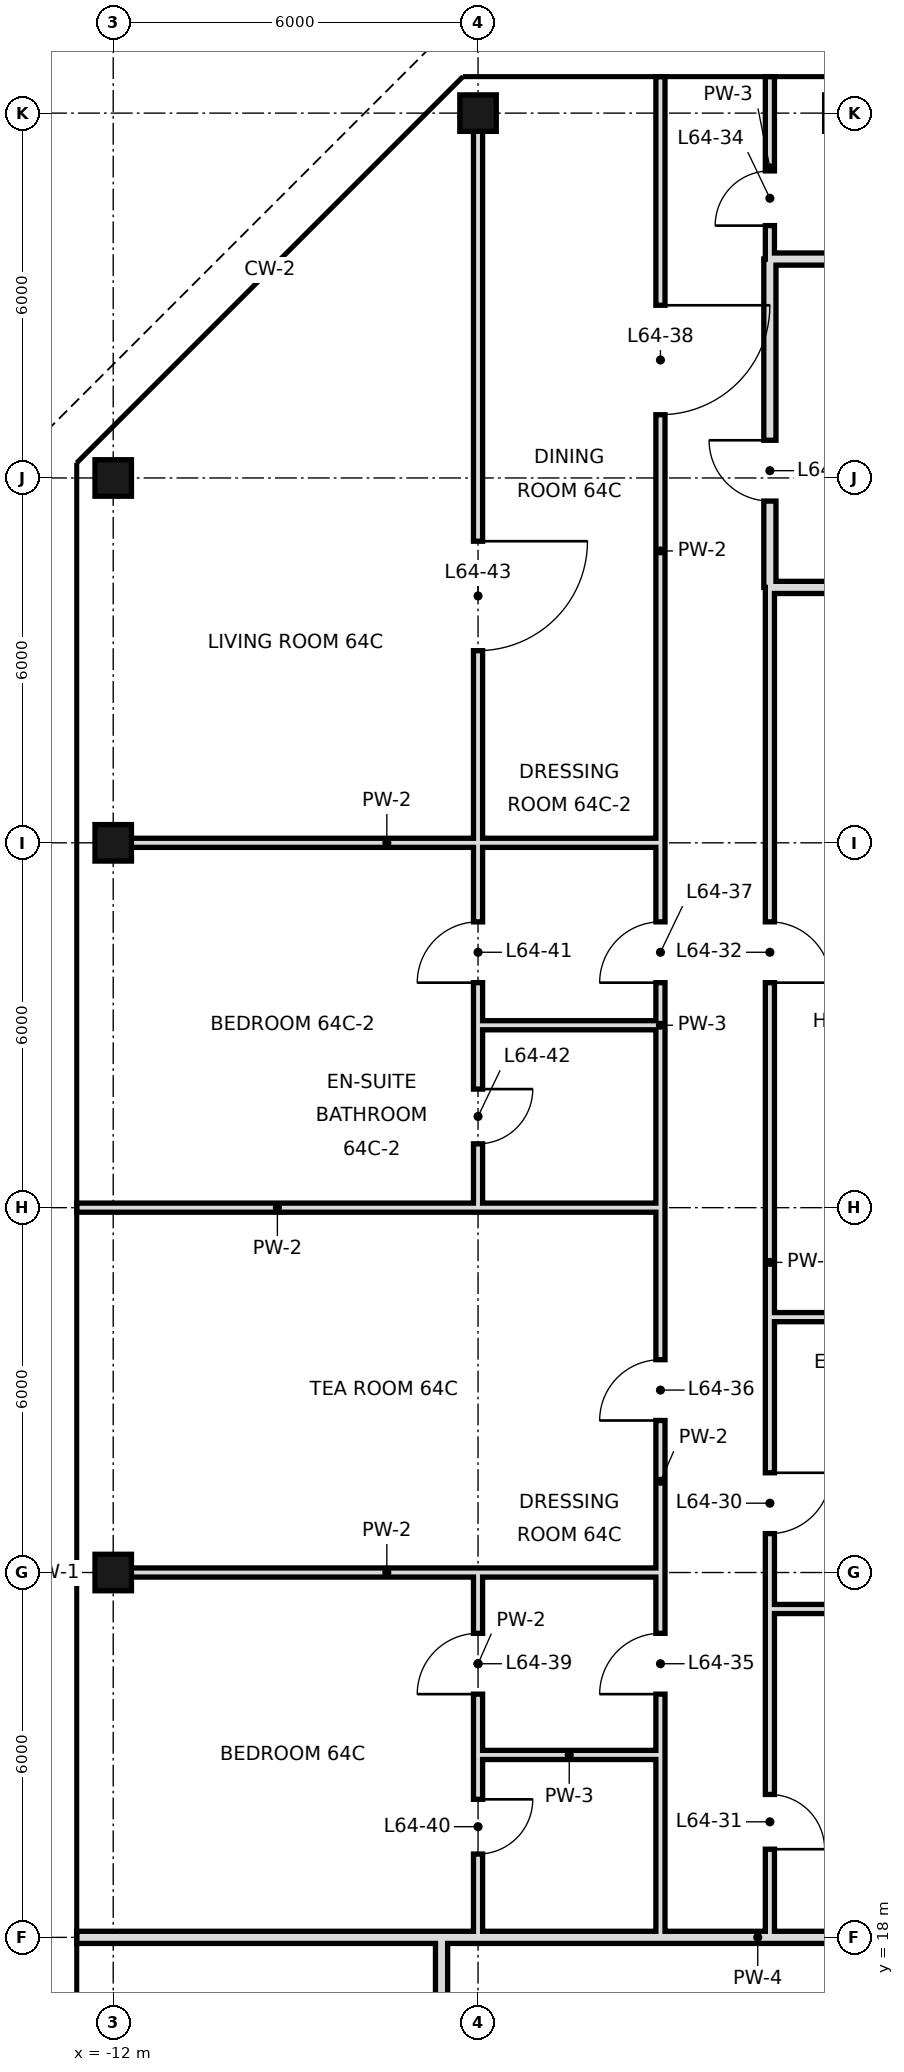
"""IFC4 building model, lengths in metres.
Left out: names, types, materials, properties, quantities, classifications, styles, units other than length and angle.
Written with IfcOpenShell. Run it as: python <this file> out.ifc"""

import sys

from ifc_helpers import new_model, si_unit, direction, frame, frame_2d, origin, origin_2d, place, context, subcontext, project, spatial, rectangle, hollow_rectangle, extrude, element, fill, save


model = new_model("IFC4")
c1 = context("Model", 3, precision=1e-05, world=origin(), true_north=direction((0.0, 1.0)))
c2 = subcontext(c1, "Body", "Model", "MODEL_VIEW")
j1 = project(units=[si_unit("LENGTHUNIT", "METRE"), si_unit("PLANEANGLEUNIT", "RADIAN")], contexts=[c1])
p1 = place(None, origin())
s1 = spatial("IfcSite", under=j1, at=p1, CompositionType="ELEMENT")
p2 = place(p1, origin())
s2 = spatial("IfcBuilding", under=s1, at=p2, CompositionType="ELEMENT")
p3 = place(p2, frame((0.0, 0.0, 270.2)))
s3 = spatial("IfcBuildingStorey", under=s2, at=p3, CompositionType="ELEMENT", Elevation=270.2)
for number, where, z_axis, x_axis in (
    (1, (-12.0, 24.0, 0.0), (0.0, 0.0, 1.0), (1.0, 0.0, 0.0)),
    (2, (-12.0, 36.0, 0.0), (0.0, 0.0, 1.0), (1.0, 0.0, 0.0)),
    (3, (-12.0, 42.0, 0.0), (0.0, 0.0, 1.0), (1.0, 0.0, 0.0)),
    (4, (-6.0, 48.0, 0.0), (0.0, 0.0, 1.0), (1.0, 0.0, 0.0)),
):
    element("IfcColumn", number, at=place(p3, frame(where, z_axis=z_axis, x_axis=x_axis)), inside=s3, PredefinedType="COLUMN", context=c2, shape_type="SweptSolid", body=[
        extrude(hollow_rectangle(XDim=0.6, YDim=0.6, WallThickness=0.028, at=origin_2d()), origin(), (0.0, 0.0, 1.0), 3.6),
    ])
p4 = place(p3, frame((-1.2, 40.2, 0.0), z_axis=(0.0, 0.0, 1.0), x_axis=(0.0, 1.0, 0.0)))
e5 = element("IfcWall", 5, at=p4, inside=s3, PredefinedType="SOLIDWALL", context=c2, shape_type="SweptSolid", body=[
    extrude(rectangle(XDim=5.4, YDim=0.2, at=frame_2d((2.7, 0.0))), origin(), (0.0, 0.0, 1.0), 2.72),
])
p5 = place(p4, frame((1.42, 0.0, 0.0)))
e6 = element("IfcOpeningElement", 6, at=p5, cuts=e5, PredefinedType="OPENING", context=c2, shape_type="SweptSolid", body=[
    extrude(rectangle(XDim=1.0, YDim=2.4, at=frame_2d((0.5, 1.2))), frame((0.0, 0.11, 0.0), z_axis=(0.0, -1.0, 0.0), x_axis=(1.0, 0.0, 0.0)), (0.0, 0.0, 1.0), 0.22),
])
p6 = place(p3, frame((-1.2, 18.0, 0.0), z_axis=(0.0, 0.0, 1.0), x_axis=(0.0, 1.0, 0.0)))
e7 = element("IfcWall", 7, at=p6, inside=s3, PredefinedType="PARTITIONING", context=c2, shape_type="SweptSolid", body=[
    extrude(rectangle(XDim=22.2, YDim=0.15, at=frame_2d((11.1, 0.0))), origin(), (0.0, 0.0, 1.0), 3.42),
])
p7 = place(p6, frame((6.64, 0.0, 0.0)))
e8 = element("IfcOpeningElement", 8, at=p7, cuts=e7, PredefinedType="OPENING", context=c2, shape_type="SweptSolid", body=[
    extrude(rectangle(XDim=1.0, YDim=2.4, at=frame_2d((0.5, 1.2))), frame((0.0, 0.085, 0.0), z_axis=(0.0, -1.0, 0.0), x_axis=(1.0, 0.0, 0.0)), (0.0, 0.0, 1.0), 0.17),
])
p8 = place(p6, frame((1.45, 0.0, 0.0)))
e9 = element("IfcOpeningElement", 9, at=p8, cuts=e7, PredefinedType="OPENING", context=c2, shape_type="SweptSolid", body=[
    extrude(rectangle(XDim=0.9, YDim=2.1, at=frame_2d((0.45, 1.05))), frame((0.0, 0.085, 0.0), z_axis=(0.0, -1.0, 0.0), x_axis=(1.0, 0.0, 0.0)), (0.0, 0.0, 1.0), 0.17),
])
p9 = place(p6, frame((15.7, 0.0, 0.0)))
e10 = element("IfcOpeningElement", 10, at=p9, cuts=e7, PredefinedType="OPENING", context=c2, shape_type="SweptSolid", body=[
    extrude(rectangle(XDim=1.0, YDim=2.4, at=frame_2d((0.5, 1.2))), frame((0.0, 0.085, 0.0), z_axis=(0.0, -1.0, 0.0), x_axis=(1.0, 0.0, 0.0)), (0.0, 0.0, 1.0), 0.17),
])
p10 = place(p3, frame((-1.2, 45.6, 0.0), z_axis=(0.0, 0.0, 1.0), x_axis=(0.0, 1.0, 0.0)))
e11 = element("IfcWall", 11, at=p10, inside=s3, PredefinedType="PARTITIONING", context=c2, shape_type="SweptSolid", body=[
    extrude(rectangle(XDim=3.0, YDim=0.15, at=frame_2d((1.5, 0.0))), origin(), (0.0, 0.0, 1.0), 3.42),
])
p11 = place(p10, frame((0.55, 0.0, 0.0)))
e12 = element("IfcOpeningElement", 12, at=p11, cuts=e11, PredefinedType="OPENING", context=c2, shape_type="SweptSolid", body=[
    extrude(rectangle(XDim=0.9, YDim=2.4, at=frame_2d((0.45, 1.2))), frame((0.0, 0.085, 0.0), z_axis=(0.0, -1.0, 0.0), x_axis=(1.0, 0.0, 0.0)), (0.0, 0.0, 1.0), 0.17),
])
p12 = place(p3, frame((-3.0, 21.0, 0.0), z_axis=(0.0, 0.0, 1.0), x_axis=(0.0, 1.0, 0.0)))
e13 = element("IfcWall", 13, at=p12, inside=s3, PredefinedType="PARTITIONING", context=c2, shape_type="SweptSolid", body=[
    extrude(rectangle(XDim=9.0, YDim=0.15, at=frame_2d((4.5, 0.0))), origin(), (0.0, 0.0, 1.0), 3.42),
])
p13 = place(p12, frame((1.0, 0.0, 0.0)))
e14 = element("IfcOpeningElement", 14, at=p13, cuts=e13, PredefinedType="OPENING", context=c2, shape_type="SweptSolid", body=[
    extrude(rectangle(XDim=1.0, YDim=2.4, at=frame_2d((0.5, 1.2))), frame((0.0, 0.085, 0.0), z_axis=(0.0, -1.0, 0.0), x_axis=(1.0, 0.0, 0.0)), (0.0, 0.0, 1.0), 0.17),
])
p14 = place(p12, frame((5.5, 0.0, 0.0)))
e15 = element("IfcOpeningElement", 15, at=p14, cuts=e13, PredefinedType="OPENING", context=c2, shape_type="SweptSolid", body=[
    extrude(rectangle(XDim=1.0, YDim=2.4, at=frame_2d((0.5, 1.2))), frame((0.0, 0.085, 0.0), z_axis=(0.0, -1.0, 0.0), x_axis=(1.0, 0.0, 0.0)), (0.0, 0.0, 1.0), 0.17),
])
p15 = place(p3, frame((-3.0, 33.0, 0.0), z_axis=(0.0, 0.0, 1.0), x_axis=(0.0, 1.0, 0.0)))
e16 = element("IfcWall", 16, at=p15, inside=s3, PredefinedType="PARTITIONING", context=c2, shape_type="SweptSolid", body=[
    extrude(rectangle(XDim=15.6, YDim=0.15, at=frame_2d((7.8, 0.0))), origin(), (0.0, 0.0, 1.0), 3.42),
])
p16 = place(p15, frame((0.7, 0.0, 0.0)))
e17 = element("IfcOpeningElement", 17, at=p16, cuts=e16, PredefinedType="OPENING", context=c2, shape_type="SweptSolid", body=[
    extrude(rectangle(XDim=1.0, YDim=2.4, at=frame_2d((0.5, 1.2))), frame((0.0, 0.085, 0.0), z_axis=(0.0, -1.0, 0.0), x_axis=(1.0, 0.0, 0.0)), (0.0, 0.0, 1.0), 0.17),
])
p17 = place(p15, frame((10.04, 0.0, 0.0)))
e18 = element("IfcOpeningElement", 18, at=p17, cuts=e16, PredefinedType="OPENING", context=c2, shape_type="SweptSolid", body=[
    extrude(rectangle(XDim=1.8, YDim=2.4, at=frame_2d((0.9, 1.2))), frame((0.0, 0.085, 0.0), z_axis=(0.0, -1.0, 0.0), x_axis=(1.0, 0.0, 0.0)), (0.0, 0.0, 1.0), 0.17),
])
for number, where, z_axis, x_axis in (
    (19, (-3.0, 18.0, 0.0), (0.0, 0.0, 1.0), (0.0, 1.0, 0.0)),
    (20, (-3.0, 30.0, 0.0), (0.0, 0.0, 1.0), (0.0, 1.0, 0.0)),
):
    element("IfcWall", number, at=place(p3, frame(where, z_axis=z_axis, x_axis=x_axis)), inside=s3, PredefinedType="PARTITIONING", context=c2, shape_type="SweptSolid", body=[
        extrude(rectangle(XDim=3.0, YDim=0.15, at=frame_2d((1.5, 0.0))), origin(), (0.0, 0.0, 1.0), 3.42),
    ])
p18 = place(p3, frame((-6.0, 21.0, 0.0), z_axis=(0.0, 0.0, 1.0), x_axis=(0.0, 1.0, 0.0)))
e21 = element("IfcWall", 21, at=p18, inside=s3, PredefinedType="PARTITIONING", context=c2, shape_type="SweptSolid", body=[
    extrude(rectangle(XDim=3.0, YDim=0.15, at=frame_2d((1.5, 0.0))), origin(), (0.0, 0.0, 1.0), 3.42),
])
p19 = place(p18, frame((1.0, 0.0, 0.0)))
e22 = element("IfcOpeningElement", 22, at=p19, cuts=e21, PredefinedType="OPENING", context=c2, shape_type="SweptSolid", body=[
    extrude(rectangle(XDim=1.0, YDim=2.4, at=frame_2d((0.5, 1.2))), frame((0.0, 0.085, 0.0), z_axis=(0.0, -1.0, 0.0), x_axis=(1.0, 0.0, 0.0)), (0.0, 0.0, 1.0), 0.17),
])
p20 = place(p3, frame((-6.0, 33.0, 0.0), z_axis=(0.0, 0.0, 1.0), x_axis=(0.0, 1.0, 0.0)))
e23 = element("IfcWall", 23, at=p20, inside=s3, PredefinedType="PARTITIONING", context=c2, shape_type="SweptSolid", body=[
    extrude(rectangle(XDim=15.0, YDim=0.15, at=frame_2d((7.5, 0.0))), origin(), (0.0, 0.0, 1.0), 3.42),
])
p21 = place(p20, frame((0.7, 0.0, 0.0)))
e24 = element("IfcOpeningElement", 24, at=p21, cuts=e23, PredefinedType="OPENING", context=c2, shape_type="SweptSolid", body=[
    extrude(rectangle(XDim=1.0, YDim=2.4, at=frame_2d((0.5, 1.2))), frame((0.0, 0.085, 0.0), z_axis=(0.0, -1.0, 0.0), x_axis=(1.0, 0.0, 0.0)), (0.0, 0.0, 1.0), 0.17),
])
p22 = place(p20, frame((6.16, 0.0, 0.0)))
e25 = element("IfcOpeningElement", 25, at=p22, cuts=e23, PredefinedType="OPENING", context=c2, shape_type="SweptSolid", body=[
    extrude(rectangle(XDim=1.8, YDim=2.4, at=frame_2d((0.9, 1.2))), frame((0.0, 0.085, 0.0), z_axis=(0.0, -1.0, 0.0), x_axis=(1.0, 0.0, 0.0)), (0.0, 0.0, 1.0), 0.17),
])
p23 = place(p3, frame((-6.0, 18.0, 0.0), z_axis=(0.0, 0.0, 1.0), x_axis=(0.0, 1.0, 0.0)))
e26 = element("IfcWall", 26, at=p23, inside=s3, PredefinedType="PARTITIONING", context=c2, shape_type="SweptSolid", body=[
    extrude(rectangle(XDim=3.0, YDim=0.15, at=frame_2d((1.5, 0.0))), origin(), (0.0, 0.0, 1.0), 3.42),
])
p24 = place(p23, frame((1.37, 0.0, 0.0)))
e27 = element("IfcOpeningElement", 27, at=p24, cuts=e26, PredefinedType="OPENING", context=c2, shape_type="SweptSolid", body=[
    extrude(rectangle(XDim=0.9, YDim=2.4, at=frame_2d((0.45, 1.2))), frame((0.0, 0.085, 0.0), z_axis=(0.0, -1.0, 0.0), x_axis=(1.0, 0.0, 0.0)), (0.0, 0.0, 1.0), 0.17),
])
p25 = place(p3, frame((-6.0, 30.0, 0.0), z_axis=(0.0, 0.0, 1.0), x_axis=(0.0, 1.0, 0.0)))
e28 = element("IfcWall", 28, at=p25, inside=s3, PredefinedType="PARTITIONING", context=c2, shape_type="SweptSolid", body=[
    extrude(rectangle(XDim=3.0, YDim=0.15, at=frame_2d((1.5, 0.0))), origin(), (0.0, 0.0, 1.0), 3.42),
])
p26 = place(p25, frame((1.05, 0.0, 0.0)))
e29 = element("IfcOpeningElement", 29, at=p26, cuts=e28, PredefinedType="OPENING", context=c2, shape_type="SweptSolid", body=[
    extrude(rectangle(XDim=0.9, YDim=2.4, at=frame_2d((0.45, 1.2))), frame((0.0, 0.085, 0.0), z_axis=(0.0, -1.0, 0.0), x_axis=(1.0, 0.0, 0.0)), (0.0, 0.0, 1.0), 0.17),
])
p27 = place(p3, frame((-6.6, 10.8, 0.0), z_axis=(0.0, 0.0, 1.0), x_axis=(0.0, 1.0, 0.0)))
e30 = element("IfcWall", 30, at=p27, inside=s3, PredefinedType="SOLIDWALL", context=c2, shape_type="SweptSolid", body=[
    extrude(rectangle(XDim=7.2, YDim=0.2, at=frame_2d((3.6, 0.0))), origin(), (0.0, 0.0, 1.0), 2.72),
])
p28 = place(p3, frame((-12.6, 18.0, 0.0), z_axis=(0.0, 0.0, 1.0), x_axis=(1.0, 0.0, 0.0)))
e31 = element("IfcWall", 31, at=p28, inside=s3, PredefinedType="SOLIDWALL", context=c2, shape_type="SweptSolid", body=[
    extrude(rectangle(XDim=6.0, YDim=0.2, at=frame_2d((3.0, 0.0))), origin(), (0.0, 0.0, 1.0), 2.72),
])
p29 = place(p3, frame((-6.6, 18.0, 0.0), z_axis=(0.0, 0.0, 1.0), x_axis=(1.0, 0.0, 0.0)))
e32 = element("IfcWall", 32, at=p29, inside=s3, PredefinedType="SOLIDWALL", context=c2, shape_type="SweptSolid", body=[
    extrude(rectangle(XDim=9.7, YDim=0.2, at=frame_2d((4.85, 0.0))), origin(), (0.0, 0.0, 1.0), 2.72),
])
p30 = place(p3, frame((-6.0, 21.0, 0.0), z_axis=(0.0, 0.0, 1.0), x_axis=(1.0, 0.0, 0.0)))
e33 = element("IfcWall", 33, at=p30, inside=s3, PredefinedType="PARTITIONING", context=c2, shape_type="SweptSolid", body=[
    extrude(rectangle(XDim=3.0, YDim=0.15, at=frame_2d((1.5, 0.0))), origin(), (0.0, 0.0, 1.0), 3.42),
])
p31 = place(p3, frame((-1.2, 23.4, 0.0), z_axis=(0.0, 0.0, 1.0), x_axis=(1.0, 0.0, 0.0)))
e34 = element("IfcWall", 34, at=p31, inside=s3, PredefinedType="PARTITIONING", context=c2, shape_type="SweptSolid", body=[
    extrude(rectangle(XDim=4.3, YDim=0.15, at=frame_2d((2.15, 0.0))), origin(), (0.0, 0.0, 1.0), 3.42),
])
p32 = place(p3, frame((-12.0, 24.0, 0.0), z_axis=(0.0, 0.0, 1.0), x_axis=(1.0, 0.0, 0.0)))
e35 = element("IfcWall", 35, at=p32, inside=s3, PredefinedType="PARTITIONING", context=c2, shape_type="SweptSolid", body=[
    extrude(rectangle(XDim=9.0, YDim=0.15, at=frame_2d((4.5, 0.0))), origin(), (0.0, 0.0, 1.0), 2.72),
])
p33 = place(p3, frame((-1.2, 28.2, 0.0), z_axis=(0.0, 0.0, 1.0), x_axis=(1.0, 0.0, 0.0)))
e36 = element("IfcWall", 36, at=p33, inside=s3, PredefinedType="PARTITIONING", context=c2, shape_type="SweptSolid", body=[
    extrude(rectangle(XDim=4.3, YDim=0.15, at=frame_2d((2.15, 0.0))), origin(), (0.0, 0.0, 1.0), 3.42),
])
p34 = place(p3, frame((-12.6, 30.0, 0.0), z_axis=(0.0, 0.0, 1.0), x_axis=(1.0, 0.0, 0.0)))
e37 = element("IfcWall", 37, at=p34, inside=s3, PredefinedType="PARTITIONING", context=c2, shape_type="SweptSolid", body=[
    extrude(rectangle(XDim=6.6, YDim=0.15, at=frame_2d((3.3, 0.0))), origin(), (0.0, 0.0, 1.0), 2.72),
])
p35 = place(p3, frame((-6.0, 30.0, 0.0), z_axis=(0.0, 0.0, 1.0), x_axis=(1.0, 0.0, 0.0)))
e38 = element("IfcWall", 38, at=p35, inside=s3, PredefinedType="PARTITIONING", context=c2, shape_type="SweptSolid", body=[
    extrude(rectangle(XDim=3.0, YDim=0.15, at=frame_2d((1.5, 0.0))), origin(), (0.0, 0.0, 1.0), 2.72),
])
p36 = place(p3, frame((-6.0, 33.0, 0.0), z_axis=(0.0, 0.0, 1.0), x_axis=(1.0, 0.0, 0.0)))
e39 = element("IfcWall", 39, at=p36, inside=s3, PredefinedType="PARTITIONING", context=c2, shape_type="SweptSolid", body=[
    extrude(rectangle(XDim=3.0, YDim=0.15, at=frame_2d((1.5, 0.0))), origin(), (0.0, 0.0, 1.0), 3.42),
])
p37 = place(p3, frame((-12.0, 36.0, 0.0), z_axis=(0.0, 0.0, 1.0), x_axis=(1.0, 0.0, 0.0)))
e40 = element("IfcWall", 40, at=p37, inside=s3, PredefinedType="PARTITIONING", context=c2, shape_type="SweptSolid", body=[
    extrude(rectangle(XDim=9.0, YDim=0.15, at=frame_2d((4.5, 0.0))), origin(), (0.0, 0.0, 1.0), 2.72),
])
for number, where, z_axis, x_axis in (
    (41, (-1.2, 40.2, 0.0), (0.0, 0.0, 1.0), (1.0, 0.0, 0.0)),
    (42, (-1.2, 45.6, 0.0), (0.0, 0.0, 1.0), (1.0, 0.0, 0.0)),
):
    element("IfcWall", number, at=place(p3, frame(where, z_axis=z_axis, x_axis=x_axis)), inside=s3, PredefinedType="SOLIDWALL", context=c2, shape_type="SweptSolid", body=[
        extrude(rectangle(XDim=4.3, YDim=0.2, at=frame_2d((2.15, 0.0))), origin(), (0.0, 0.0, 1.0), 2.72),
    ])
p38 = place(p7, origin())
e43 = element("IfcDoor", 43, at=p38, inside=s3, OperationType="SINGLE_SWING_RIGHT", PredefinedType="DOOR", context=c2, shape_type="SweptSolid", body=[
    extrude(rectangle(XDim=1.0, YDim=2.4, at=frame_2d((0.5, 1.2))), frame((0.0, 0.025, 0.0), z_axis=(0.0, -1.0, 0.0), x_axis=(1.0, 0.0, 0.0)), (0.0, 0.0, 1.0), 0.05),
])
fill(e8, e43)
p39 = place(p8, frame((0.9, 0.0, 0.0), z_axis=(0.0, 0.0, 1.0), x_axis=(-1.0, 0.0, 0.0)))
e44 = element("IfcDoor", 44, at=p39, inside=s3, OperationType="SINGLE_SWING_RIGHT", PredefinedType="DOOR", context=c2, shape_type="SweptSolid", body=[
    extrude(rectangle(XDim=0.9, YDim=2.1, at=frame_2d((0.45, 1.05))), frame((0.0, 0.025, 0.0), z_axis=(0.0, -1.0, 0.0), x_axis=(1.0, 0.0, 0.0)), (0.0, 0.0, 1.0), 0.05),
])
fill(e9, e44)
p40 = place(p9, frame((1.0, 0.0, 0.0), z_axis=(0.0, 0.0, 1.0), x_axis=(-1.0, 0.0, 0.0)))
e45 = element("IfcDoor", 45, at=p40, inside=s3, OperationType="SINGLE_SWING_RIGHT", PredefinedType="DOOR", context=c2, shape_type="SweptSolid", body=[
    extrude(rectangle(XDim=1.0, YDim=2.4, at=frame_2d((0.5, 1.2))), frame((0.0, 0.025, 0.0), z_axis=(0.0, -1.0, 0.0), x_axis=(1.0, 0.0, 0.0)), (0.0, 0.0, 1.0), 0.05),
])
fill(e10, e45)
p41 = place(p5, frame((1.0, 0.0, 0.0), z_axis=(0.0, 0.0, 1.0), x_axis=(-1.0, 0.0, 0.0)))
e46 = element("IfcDoor", 46, at=p41, inside=s3, OperationType="SINGLE_SWING_LEFT", PredefinedType="DOOR", context=c2, shape_type="SweptSolid", body=[
    extrude(rectangle(XDim=1.0, YDim=2.4, at=frame_2d((0.5, 1.2))), frame((0.0, 0.025, 0.0), z_axis=(0.0, -1.0, 0.0), x_axis=(1.0, 0.0, 0.0)), (0.0, 0.0, 1.0), 0.05),
])
fill(e6, e46)
p42 = place(p11, origin())
e47 = element("IfcDoor", 47, at=p42, inside=s3, OperationType="SINGLE_SWING_LEFT", PredefinedType="DOOR", context=c2, shape_type="SweptSolid", body=[
    extrude(rectangle(XDim=0.9, YDim=2.4, at=frame_2d((0.45, 1.2))), frame((0.0, 0.025, 0.0), z_axis=(0.0, -1.0, 0.0), x_axis=(1.0, 0.0, 0.0)), (0.0, 0.0, 1.0), 0.05),
])
fill(e12, e47)
p43 = place(p13, origin())
e48 = element("IfcDoor", 48, at=p43, inside=s3, OperationType="SINGLE_SWING_LEFT", PredefinedType="DOOR", context=c2, shape_type="SweptSolid", body=[
    extrude(rectangle(XDim=1.0, YDim=2.4, at=frame_2d((0.5, 1.2))), frame((0.0, 0.025, 0.0), z_axis=(0.0, -1.0, 0.0), x_axis=(1.0, 0.0, 0.0)), (0.0, 0.0, 1.0), 0.05),
])
fill(e14, e48)
p44 = place(p14, origin())
e49 = element("IfcDoor", 49, at=p44, inside=s3, OperationType="SINGLE_SWING_LEFT", PredefinedType="DOOR", context=c2, shape_type="SweptSolid", body=[
    extrude(rectangle(XDim=1.0, YDim=2.4, at=frame_2d((0.5, 1.2))), frame((0.0, 0.025, 0.0), z_axis=(0.0, -1.0, 0.0), x_axis=(1.0, 0.0, 0.0)), (0.0, 0.0, 1.0), 0.05),
])
fill(e15, e49)
p45 = place(p16, origin())
e50 = element("IfcDoor", 50, at=p45, inside=s3, OperationType="SINGLE_SWING_LEFT", PredefinedType="DOOR", context=c2, shape_type="SweptSolid", body=[
    extrude(rectangle(XDim=1.0, YDim=2.4, at=frame_2d((0.5, 1.2))), frame((0.0, 0.025, 0.0), z_axis=(0.0, -1.0, 0.0), x_axis=(1.0, 0.0, 0.0)), (0.0, 0.0, 1.0), 0.05),
])
fill(e17, e50)
p46 = place(p17, origin())
e51 = element("IfcDoor", 51, at=p46, inside=s3, OperationType="SINGLE_SWING_RIGHT", PredefinedType="DOOR", context=c2, shape_type="SweptSolid", body=[
    extrude(rectangle(XDim=1.8, YDim=2.4, at=frame_2d((0.9, 1.2))), frame((0.0, 0.025, 0.0), z_axis=(0.0, -1.0, 0.0), x_axis=(1.0, 0.0, 0.0)), (0.0, 0.0, 1.0), 0.05),
])
fill(e18, e51)
p47 = place(p19, origin())
e52 = element("IfcDoor", 52, at=p47, inside=s3, OperationType="SINGLE_SWING_LEFT", PredefinedType="DOOR", context=c2, shape_type="SweptSolid", body=[
    extrude(rectangle(XDim=1.0, YDim=2.4, at=frame_2d((0.5, 1.2))), frame((0.0, 0.025, 0.0), z_axis=(0.0, -1.0, 0.0), x_axis=(1.0, 0.0, 0.0)), (0.0, 0.0, 1.0), 0.05),
])
fill(e22, e52)
p48 = place(p24, origin())
e53 = element("IfcDoor", 53, at=p48, inside=s3, OperationType="SINGLE_SWING_RIGHT", PredefinedType="DOOR", context=c2, shape_type="SweptSolid", body=[
    extrude(rectangle(XDim=0.9, YDim=2.4, at=frame_2d((0.45, 1.2))), frame((0.0, 0.025, 0.0), z_axis=(0.0, -1.0, 0.0), x_axis=(1.0, 0.0, 0.0)), (0.0, 0.0, 1.0), 0.05),
])
fill(e27, e53)
p49 = place(p21, origin())
e54 = element("IfcDoor", 54, at=p49, inside=s3, OperationType="SINGLE_SWING_LEFT", PredefinedType="DOOR", context=c2, shape_type="SweptSolid", body=[
    extrude(rectangle(XDim=1.0, YDim=2.4, at=frame_2d((0.5, 1.2))), frame((0.0, 0.025, 0.0), z_axis=(0.0, -1.0, 0.0), x_axis=(1.0, 0.0, 0.0)), (0.0, 0.0, 1.0), 0.05),
])
fill(e24, e54)
p50 = place(p26, origin())
e55 = element("IfcDoor", 55, at=p50, inside=s3, OperationType="SINGLE_SWING_RIGHT", PredefinedType="DOOR", context=c2, shape_type="SweptSolid", body=[
    extrude(rectangle(XDim=0.9, YDim=2.4, at=frame_2d((0.45, 1.2))), frame((0.0, 0.025, 0.0), z_axis=(0.0, -1.0, 0.0), x_axis=(1.0, 0.0, 0.0)), (0.0, 0.0, 1.0), 0.05),
])
fill(e29, e55)
p51 = place(p22, origin())
e56 = element("IfcDoor", 56, at=p51, inside=s3, OperationType="SINGLE_SWING_RIGHT", PredefinedType="DOOR", context=c2, shape_type="SweptSolid", body=[
    extrude(rectangle(XDim=1.8, YDim=2.4, at=frame_2d((0.9, 1.2))), frame((0.0, 0.025, 0.0), z_axis=(0.0, -1.0, 0.0), x_axis=(1.0, 0.0, 0.0)), (0.0, 0.0, 1.0), 0.05),
])
fill(e25, e56)
save(model, sys.argv[1])
